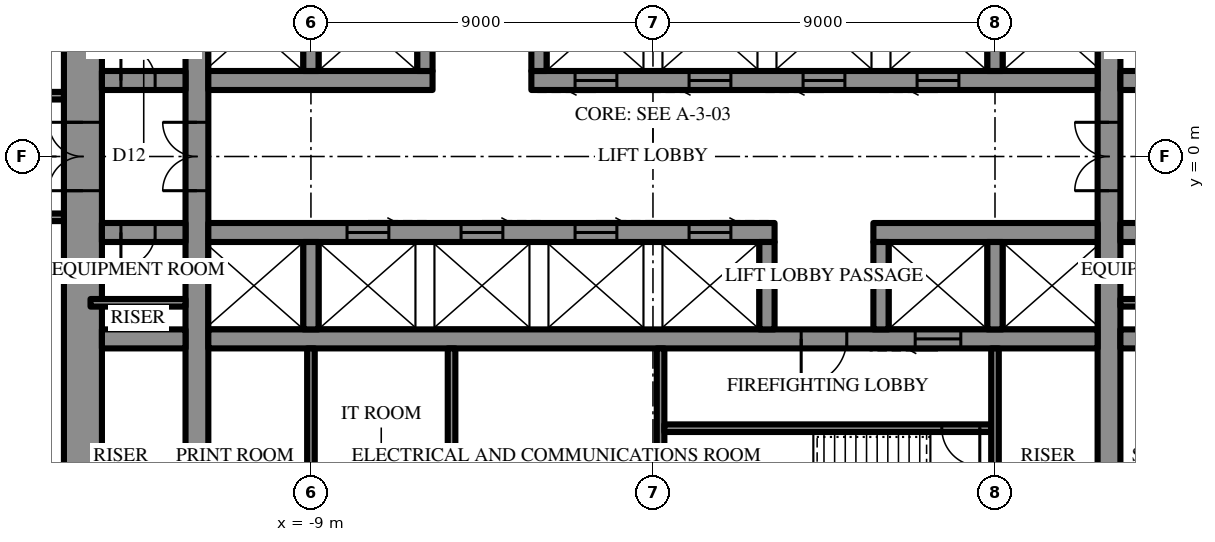
"""IFC4 building model, lengths in metres.
Left out: names, types, materials, properties, quantities, classifications, styles, units other than length and angle.
Written with IfcOpenShell. Run it as: python <this file> out.ifc"""

import sys

from ifc_helpers import new_model, si_unit, direction, frame, frame_2d, origin, place, context, subcontext, project, spatial, rectangle, extrude, element, fill, save


model = new_model("IFC4")
c1 = context("Model", 3, precision=1e-05, world=origin(), true_north=direction((0.0, 1.0)))
c2 = subcontext(c1, "Body", "Model", "MODEL_VIEW")
j1 = project(units=[si_unit("LENGTHUNIT", "METRE"), si_unit("PLANEANGLEUNIT", "RADIAN")], contexts=[c1])
p1 = place(None, origin())
s1 = spatial("IfcSite", under=j1, at=p1, CompositionType="ELEMENT")
p2 = place(p1, origin())
s2 = spatial("IfcBuilding", under=s1, at=p2, CompositionType="ELEMENT")
p3 = place(p2, frame((0.0, 0.0, 240.7)))
s3 = spatial("IfcBuildingStorey", under=s2, at=p3, CompositionType="ELEMENT", Elevation=240.7)
p4 = place(p3, frame((-15.0, 10.7, 0.0), z_axis=(0.0, 0.0, 1.0), x_axis=(0.0, -1.0, 0.0)))
e1 = element("IfcWall", 1, at=p4, inside=s3, PredefinedType="SHEAR", context=c2, shape_type="SweptSolid", body=[
    extrude(rectangle(XDim=21.4, YDim=1.0, at=frame_2d((10.7, 0.0))), origin(), (0.0, 0.0, 1.0), 4.2),
])
p5 = place(p4, frame((9.8, 0.0, 0.0)))
e2 = element("IfcOpeningElement", 2, at=p5, cuts=e1, PredefinedType="OPENING", context=c2, shape_type="SweptSolid", body=[
    extrude(rectangle(XDim=1.8, YDim=2.4, at=frame_2d((0.9, 1.2))), frame((0.0, 0.51, 0.0), z_axis=(0.0, -1.0, 0.0), x_axis=(1.0, 0.0, 0.0)), (0.0, 0.0, 1.0), 1.02),
])
p6 = place(p3, frame((12.0, -10.7, 0.0), z_axis=(0.0, 0.0, 1.0), x_axis=(0.0, 1.0, 0.0)))
e3 = element("IfcWall", 3, at=p6, inside=s3, PredefinedType="SHEAR", context=c2, shape_type="SweptSolid", body=[
    extrude(rectangle(XDim=21.4, YDim=0.6, at=frame_2d((10.7, 0.0))), origin(), (0.0, 0.0, 1.0), 4.2),
])
p7 = place(p6, frame((9.8, 0.0, 0.0)))
e4 = element("IfcOpeningElement", 4, at=p7, cuts=e3, PredefinedType="OPENING", context=c2, shape_type="SweptSolid", body=[
    extrude(rectangle(XDim=1.8, YDim=2.4, at=frame_2d((0.9, 1.2))), frame((0.0, 0.31, 0.0), z_axis=(0.0, -1.0, 0.0), x_axis=(1.0, 0.0, 0.0)), (0.0, 0.0, 1.0), 0.62),
])
p8 = place(p3, frame((-12.0, -10.7, 0.0), z_axis=(0.0, 0.0, 1.0), x_axis=(0.0, 1.0, 0.0)))
e5 = element("IfcWall", 5, at=p8, inside=s3, PredefinedType="SHEAR", context=c2, shape_type="SweptSolid", body=[
    extrude(rectangle(XDim=21.4, YDim=0.6, at=frame_2d((10.7, 0.0))), origin(), (0.0, 0.0, 1.0), 4.2),
])
p9 = place(p8, frame((9.8, 0.0, 0.0)))
e6 = element("IfcOpeningElement", 6, at=p9, cuts=e5, PredefinedType="OPENING", context=c2, shape_type="SweptSolid", body=[
    extrude(rectangle(XDim=1.8, YDim=2.4, at=frame_2d((0.9, 1.2))), frame((0.0, 0.31, 0.0), z_axis=(0.0, -1.0, 0.0), x_axis=(1.0, 0.0, 0.0)), (0.0, 0.0, 1.0), 0.62),
])
p10 = place(p3, frame((-14.5, 2.0, 0.0), z_axis=(0.0, 0.0, 1.0), x_axis=(1.0, 0.0, 0.0)))
e7 = element("IfcWall", 7, at=p10, inside=s3, PredefinedType="SHEAR", context=c2, shape_type="SweptSolid", body=[
    extrude(rectangle(XDim=2.2, YDim=0.5, at=frame_2d((1.1, 0.0))), origin(), (0.0, 0.0, 1.0), 4.2),
])
p11 = place(p10, frame((0.5, 0.0, 0.0)))
e8 = element("IfcOpeningElement", 8, at=p11, cuts=e7, PredefinedType="OPENING", context=c2, shape_type="SweptSolid", body=[
    extrude(rectangle(XDim=0.9, YDim=2.2, at=frame_2d((0.45, 1.1))), frame((0.0, 0.26, 0.0), z_axis=(0.0, -1.0, 0.0), x_axis=(1.0, 0.0, 0.0)), (0.0, 0.0, 1.0), 0.52),
])
p12 = place(p3, frame((-11.7, 2.0, 0.0), z_axis=(0.0, 0.0, 1.0), x_axis=(1.0, 0.0, 0.0)))
e9 = element("IfcWall", 9, at=p12, inside=s3, PredefinedType="SHEAR", context=c2, shape_type="SweptSolid", body=[
    extrude(rectangle(XDim=5.9, YDim=0.5, at=frame_2d((2.95, 0.0))), origin(), (0.0, 0.0, 1.0), 4.2),
])
p13 = place(p3, frame((-3.2, 2.0, 0.0), z_axis=(0.0, 0.0, 1.0), x_axis=(1.0, 0.0, 0.0)))
e10 = element("IfcWall", 10, at=p13, inside=s3, PredefinedType="SHEAR", context=c2, shape_type="SweptSolid", body=[
    extrude(rectangle(XDim=14.9, YDim=0.5, at=frame_2d((7.45, 0.0))), origin(), (0.0, 0.0, 1.0), 4.2),
])
p14 = place(p13, frame((1.15, 0.0, 0.0)))
e11 = element("IfcOpeningElement", 11, at=p14, cuts=e10, PredefinedType="OPENING", context=c2, shape_type="SweptSolid", body=[
    extrude(rectangle(XDim=1.1, YDim=2.2, at=frame_2d((0.55, 1.1))), frame((0.0, 0.26, 0.0), z_axis=(0.0, -1.0, 0.0), x_axis=(1.0, 0.0, 0.0)), (0.0, 0.0, 1.0), 0.52),
])
p15 = place(p13, frame((4.15, 0.0, 0.0)))
e12 = element("IfcOpeningElement", 12, at=p15, cuts=e10, PredefinedType="OPENING", context=c2, shape_type="SweptSolid", body=[
    extrude(rectangle(XDim=1.1, YDim=2.2, at=frame_2d((0.55, 1.1))), frame((0.0, 0.26, 0.0), z_axis=(0.0, -1.0, 0.0), x_axis=(1.0, 0.0, 0.0)), (0.0, 0.0, 1.0), 0.52),
])
p16 = place(p13, frame((7.15, 0.0, 0.0)))
e13 = element("IfcOpeningElement", 13, at=p16, cuts=e10, PredefinedType="OPENING", context=c2, shape_type="SweptSolid", body=[
    extrude(rectangle(XDim=1.1, YDim=2.2, at=frame_2d((0.55, 1.1))), frame((0.0, 0.26, 0.0), z_axis=(0.0, -1.0, 0.0), x_axis=(1.0, 0.0, 0.0)), (0.0, 0.0, 1.0), 0.52),
])
p17 = place(p13, frame((10.15, 0.0, 0.0)))
e14 = element("IfcOpeningElement", 14, at=p17, cuts=e10, PredefinedType="OPENING", context=c2, shape_type="SweptSolid", body=[
    extrude(rectangle(XDim=1.1, YDim=2.2, at=frame_2d((0.55, 1.1))), frame((0.0, 0.26, 0.0), z_axis=(0.0, -1.0, 0.0), x_axis=(1.0, 0.0, 0.0)), (0.0, 0.0, 1.0), 0.52),
])
p18 = place(p3, frame((12.3, 2.0, 0.0), z_axis=(0.0, 0.0, 1.0), x_axis=(1.0, 0.0, 0.0)))
e15 = element("IfcWall", 15, at=p18, inside=s3, PredefinedType="SHEAR", context=c2, shape_type="SweptSolid", body=[
    extrude(rectangle(XDim=2.2, YDim=0.5, at=frame_2d((1.1, 0.0))), origin(), (0.0, 0.0, 1.0), 4.2),
])
p19 = place(p18, frame((0.8, 0.0, 0.0)))
e16 = element("IfcOpeningElement", 16, at=p19, cuts=e15, PredefinedType="OPENING", context=c2, shape_type="SweptSolid", body=[
    extrude(rectangle(XDim=0.9, YDim=2.2, at=frame_2d((0.45, 1.1))), frame((0.0, 0.26, 0.0), z_axis=(0.0, -1.0, 0.0), x_axis=(1.0, 0.0, 0.0)), (0.0, 0.0, 1.0), 0.52),
])
for number, where, z_axis, x_axis in (
    (17, (-9.0, 2.25, 0.0), (0.0, 0.0, 1.0), (0.0, 1.0, 0.0)),
    (18, (-6.0, 2.25, 0.0), (0.0, 0.0, 1.0), (0.0, 1.0, 0.0)),
    (19, (-3.0, 2.25, 0.0), (0.0, 0.0, 1.0), (0.0, 1.0, 0.0)),
    (20, (9.0, 2.25, 0.0), (0.0, 0.0, 1.0), (0.0, 1.0, 0.0)),
):
    element("IfcWall", number, at=place(p3, frame(where, z_axis=z_axis, x_axis=x_axis)), inside=s3, PredefinedType="SHEAR", context=c2, shape_type="SweptSolid", body=[
        extrude(rectangle(XDim=2.3, YDim=0.4, at=frame_2d((1.15, 0.0))), origin(), (0.0, 0.0, 1.0), 4.2),
    ])
p20 = place(p3, frame((14.5, -2.0, 0.0), z_axis=(0.0, 0.0, 1.0), x_axis=(-1.0, 0.0, 0.0)))
e21 = element("IfcWall", 21, at=p20, inside=s3, PredefinedType="SHEAR", context=c2, shape_type="SweptSolid", body=[
    extrude(rectangle(XDim=2.2, YDim=0.5, at=frame_2d((1.1, 0.0))), origin(), (0.0, 0.0, 1.0), 4.2),
])
p21 = place(p20, frame((0.5, 0.0, 0.0)))
e22 = element("IfcOpeningElement", 22, at=p21, cuts=e21, PredefinedType="OPENING", context=c2, shape_type="SweptSolid", body=[
    extrude(rectangle(XDim=0.9, YDim=2.2, at=frame_2d((0.45, 1.1))), frame((0.0, 0.26, 0.0), z_axis=(0.0, -1.0, 0.0), x_axis=(1.0, 0.0, 0.0)), (0.0, 0.0, 1.0), 0.52),
])
p22 = place(p3, frame((11.7, -2.0, 0.0), z_axis=(0.0, 0.0, 1.0), x_axis=(-1.0, 0.0, 0.0)))
e23 = element("IfcWall", 23, at=p22, inside=s3, PredefinedType="SHEAR", context=c2, shape_type="SweptSolid", body=[
    extrude(rectangle(XDim=5.9, YDim=0.5, at=frame_2d((2.95, 0.0))), origin(), (0.0, 0.0, 1.0), 4.2),
])
p23 = place(p3, frame((3.2, -2.0, 0.0), z_axis=(0.0, 0.0, 1.0), x_axis=(-1.0, 0.0, 0.0)))
e24 = element("IfcWall", 24, at=p23, inside=s3, PredefinedType="SHEAR", context=c2, shape_type="SweptSolid", body=[
    extrude(rectangle(XDim=14.9, YDim=0.5, at=frame_2d((7.45, 0.0))), origin(), (0.0, 0.0, 1.0), 4.2),
])
p24 = place(p23, frame((1.15, 0.0, 0.0)))
e25 = element("IfcOpeningElement", 25, at=p24, cuts=e24, PredefinedType="OPENING", context=c2, shape_type="SweptSolid", body=[
    extrude(rectangle(XDim=1.1, YDim=2.2, at=frame_2d((0.55, 1.1))), frame((0.0, 0.26, 0.0), z_axis=(0.0, -1.0, 0.0), x_axis=(1.0, 0.0, 0.0)), (0.0, 0.0, 1.0), 0.52),
])
p25 = place(p23, frame((4.15, 0.0, 0.0)))
e26 = element("IfcOpeningElement", 26, at=p25, cuts=e24, PredefinedType="OPENING", context=c2, shape_type="SweptSolid", body=[
    extrude(rectangle(XDim=1.1, YDim=2.2, at=frame_2d((0.55, 1.1))), frame((0.0, 0.26, 0.0), z_axis=(0.0, -1.0, 0.0), x_axis=(1.0, 0.0, 0.0)), (0.0, 0.0, 1.0), 0.52),
])
p26 = place(p23, frame((7.15, 0.0, 0.0)))
e27 = element("IfcOpeningElement", 27, at=p26, cuts=e24, PredefinedType="OPENING", context=c2, shape_type="SweptSolid", body=[
    extrude(rectangle(XDim=1.1, YDim=2.2, at=frame_2d((0.55, 1.1))), frame((0.0, 0.26, 0.0), z_axis=(0.0, -1.0, 0.0), x_axis=(1.0, 0.0, 0.0)), (0.0, 0.0, 1.0), 0.52),
])
p27 = place(p23, frame((10.15, 0.0, 0.0)))
e28 = element("IfcOpeningElement", 28, at=p27, cuts=e24, PredefinedType="OPENING", context=c2, shape_type="SweptSolid", body=[
    extrude(rectangle(XDim=1.1, YDim=2.2, at=frame_2d((0.55, 1.1))), frame((0.0, 0.26, 0.0), z_axis=(0.0, -1.0, 0.0), x_axis=(1.0, 0.0, 0.0)), (0.0, 0.0, 1.0), 0.52),
])
p28 = place(p3, frame((-12.3, -2.0, 0.0), z_axis=(0.0, 0.0, 1.0), x_axis=(-1.0, 0.0, 0.0)))
e29 = element("IfcWall", 29, at=p28, inside=s3, PredefinedType="SHEAR", context=c2, shape_type="SweptSolid", body=[
    extrude(rectangle(XDim=2.2, YDim=0.5, at=frame_2d((1.1, 0.0))), origin(), (0.0, 0.0, 1.0), 4.2),
])
p29 = place(p28, frame((0.8, 0.0, 0.0)))
e30 = element("IfcOpeningElement", 30, at=p29, cuts=e29, PredefinedType="OPENING", context=c2, shape_type="SweptSolid", body=[
    extrude(rectangle(XDim=0.9, YDim=2.2, at=frame_2d((0.45, 1.1))), frame((0.0, 0.26, 0.0), z_axis=(0.0, -1.0, 0.0), x_axis=(1.0, 0.0, 0.0)), (0.0, 0.0, 1.0), 0.52),
])
p30 = place(p3, frame((14.5, -4.8, 0.0), z_axis=(0.0, 0.0, 1.0), x_axis=(-1.0, 0.0, 0.0)))
e31 = element("IfcWall", 31, at=p30, inside=s3, PredefinedType="SHEAR", context=c2, shape_type="SweptSolid", body=[
    extrude(rectangle(XDim=2.2, YDim=0.5, at=frame_2d((1.1, 0.0))), origin(), (0.0, 0.0, 1.0), 4.2),
])
p31 = place(p3, frame((11.7, -4.8, 0.0), z_axis=(0.0, 0.0, 1.0), x_axis=(-1.0, 0.0, 0.0)))
e32 = element("IfcWall", 32, at=p31, inside=s3, PredefinedType="SHEAR", context=c2, shape_type="SweptSolid", body=[
    extrude(rectangle(XDim=23.4, YDim=0.5, at=frame_2d((11.7, 0.0))), origin(), (0.0, 0.0, 1.0), 4.2),
])
p32 = place(p31, frame((6.6, 0.0, 0.0)))
e33 = element("IfcOpeningElement", 33, at=p32, cuts=e32, PredefinedType="OPENING", context=c2, shape_type="SweptSolid", body=[
    extrude(rectangle(XDim=1.2, YDim=2.2, at=frame_2d((0.6, 1.1))), frame((0.0, 0.26, 0.0), z_axis=(0.0, -1.0, 0.0), x_axis=(1.0, 0.0, 0.0)), (0.0, 0.0, 1.0), 0.52),
])
p33 = place(p31, frame((3.6, 0.0, 0.0)))
e34 = element("IfcOpeningElement", 34, at=p33, cuts=e32, PredefinedType="OPENING", context=c2, shape_type="SweptSolid", body=[
    extrude(rectangle(XDim=1.2, YDim=2.2, at=frame_2d((0.6, 1.1))), frame((0.0, 0.26, 0.0), z_axis=(0.0, -1.0, 0.0), x_axis=(1.0, 0.0, 0.0)), (0.0, 0.0, 1.0), 0.52),
])
p34 = place(p3, frame((-12.3, -4.8, 0.0), z_axis=(0.0, 0.0, 1.0), x_axis=(-1.0, 0.0, 0.0)))
e35 = element("IfcWall", 35, at=p34, inside=s3, PredefinedType="SHEAR", context=c2, shape_type="SweptSolid", body=[
    extrude(rectangle(XDim=2.2, YDim=0.5, at=frame_2d((1.1, 0.0))), origin(), (0.0, 0.0, 1.0), 4.2),
])
for number, where, z_axis, x_axis in (
    (36, (9.0, -2.25, 0.0), (0.0, 0.0, 1.0), (0.0, -1.0, 0.0)),
    (37, (6.0, -2.25, 0.0), (0.0, 0.0, 1.0), (0.0, -1.0, 0.0)),
    (38, (3.0, -2.25, 0.0), (0.0, 0.0, 1.0), (0.0, -1.0, 0.0)),
    (39, (-9.0, -2.25, 0.0), (0.0, 0.0, 1.0), (0.0, -1.0, 0.0)),
):
    element("IfcWall", number, at=place(p3, frame(where, z_axis=z_axis, x_axis=x_axis)), inside=s3, PredefinedType="SHEAR", context=c2, shape_type="SweptSolid", body=[
        extrude(rectangle(XDim=2.3, YDim=0.4, at=frame_2d((1.15, 0.0))), origin(), (0.0, 0.0, 1.0), 4.2),
    ])
p35 = place(p3, frame((0.2, -5.05, 0.0), z_axis=(0.0, 0.0, 1.0), x_axis=(0.0, -1.0, 0.0)))
e40 = element("IfcWall", 40, at=p35, inside=s3, PredefinedType="SHEAR", context=c2, shape_type="SweptSolid", body=[
    extrude(rectangle(XDim=5.65, YDim=0.2, at=frame_2d((2.825, 0.0))), origin(), (0.0, 0.0, 1.0), 4.2),
])
p36 = place(p3, frame((8.9, -7.15, 0.0), z_axis=(0.0, 0.0, 1.0), x_axis=(-1.0, 0.0, 0.0)))
e41 = element("IfcWall", 41, at=p36, inside=s3, PredefinedType="SHEAR", context=c2, shape_type="SweptSolid", body=[
    extrude(rectangle(XDim=8.6, YDim=0.2, at=frame_2d((4.3, 0.0))), origin(), (0.0, 0.0, 1.0), 4.2),
])
p37 = place(p36, frame((0.3, 0.0, 0.0)))
e42 = element("IfcOpeningElement", 42, at=p37, cuts=e41, PredefinedType="OPENING", context=c2, shape_type="SweptSolid", body=[
    extrude(rectangle(XDim=1.0, YDim=2.2, at=frame_2d((0.5, 1.1))), frame((0.0, 0.11, 0.0), z_axis=(0.0, -1.0, 0.0), x_axis=(1.0, 0.0, 0.0)), (0.0, 0.0, 1.0), 0.22),
])
for number, where, z_axis, x_axis in (
    (43, (9.0, -5.05, 0.0), (0.0, 0.0, 1.0), (0.0, -1.0, 0.0)),
    (44, (-9.0, -5.05, 0.0), (0.0, 0.0, 1.0), (0.0, -1.0, 0.0)),
    (45, (-5.3, -5.05, 0.0), (0.0, 0.0, 1.0), (0.0, -1.0, 0.0)),
):
    element("IfcWall", number, at=place(p3, frame(where, z_axis=z_axis, x_axis=x_axis)), inside=s3, PredefinedType="PARTITIONING", context=c2, shape_type="SweptSolid", body=[
        extrude(rectangle(XDim=5.65, YDim=0.2, at=frame_2d((2.825, 0.0))), origin(), (0.0, 0.0, 1.0), 4.0),
    ])
for number, where, z_axis, x_axis in (
    (46, (14.8, -3.85, 0.0), (0.0, 0.0, 1.0), (-1.0, 0.0, 0.0)),
    (47, (-12.3, -3.85, 0.0), (0.0, 0.0, 1.0), (-1.0, 0.0, 0.0)),
):
    element("IfcWall", number, at=place(p3, frame(where, z_axis=z_axis, x_axis=x_axis)), inside=s3, PredefinedType="PARTITIONING", context=c2, shape_type="SweptSolid", body=[
        extrude(rectangle(XDim=2.5, YDim=0.2, at=frame_2d((1.25, 0.0))), origin(), (0.0, 0.0, 1.0), 4.0),
    ])
p38 = place(p3, frame((-15.5, 1.6, 0.0), z_axis=(0.0, 0.0, 1.0), x_axis=(-1.0, 0.0, 0.0)))
e48 = element("IfcWall", 48, at=p38, inside=s3, PredefinedType="PARTITIONING", context=c2, shape_type="SweptSolid", body=[
    extrude(rectangle(XDim=9.7, YDim=0.2, at=frame_2d((4.85, 0.0))), origin(), (0.0, 0.0, 1.0), 4.0),
])
p39 = place(p38, frame((6.29, 0.0, 0.0)))
e49 = element("IfcOpeningElement", 49, at=p39, cuts=e48, PredefinedType="OPENING", context=c2, shape_type="SweptSolid", body=[
    extrude(rectangle(XDim=1.0, YDim=2.2, at=frame_2d((0.5, 1.1))), frame((0.0, 0.11, 0.0), z_axis=(0.0, -1.0, 0.0), x_axis=(1.0, 0.0, 0.0)), (0.0, 0.0, 1.0), 0.22),
])
p40 = place(p3, frame((-15.5, -1.6, 0.0), z_axis=(0.0, 0.0, 1.0), x_axis=(-1.0, 0.0, 0.0)))
e50 = element("IfcWall", 50, at=p40, inside=s3, PredefinedType="PARTITIONING", context=c2, shape_type="SweptSolid", body=[
    extrude(rectangle(XDim=2.3, YDim=0.2, at=frame_2d((1.15, 0.0))), origin(), (0.0, 0.0, 1.0), 4.0),
])
p41 = place(p5, frame((1.8, 0.0, 0.0), z_axis=(0.0, 0.0, 1.0), x_axis=(-1.0, 0.0, 0.0)))
e51 = element("IfcDoor", 51, at=p41, inside=s3, OperationType="DOUBLE_DOOR_SINGLE_SWING", PredefinedType="DOOR", context=c2, shape_type="SweptSolid", body=[
    extrude(rectangle(XDim=1.8, YDim=2.4, at=frame_2d((0.9, 1.2))), frame((0.0, 0.025, 0.0), z_axis=(0.0, -1.0, 0.0), x_axis=(1.0, 0.0, 0.0)), (0.0, 0.0, 1.0), 0.05),
])
fill(e2, e51)
p42 = place(p32, origin())
e52 = element("IfcDoor", 52, at=p42, inside=s3, OperationType="SINGLE_SWING_LEFT", PredefinedType="DOOR", context=c2, shape_type="SweptSolid", body=[
    extrude(rectangle(XDim=1.2, YDim=2.2, at=frame_2d((0.6, 1.1))), frame((0.0, 0.025, 0.0), z_axis=(0.0, -1.0, 0.0), x_axis=(1.0, 0.0, 0.0)), (0.0, 0.0, 1.0), 0.05),
])
fill(e33, e52)
p43 = place(p37, origin())
e53 = element("IfcDoor", 53, at=p43, inside=s3, OperationType="SINGLE_SWING_RIGHT", PredefinedType="DOOR", context=c2, shape_type="SweptSolid", body=[
    extrude(rectangle(XDim=1.0, YDim=2.2, at=frame_2d((0.5, 1.1))), frame((0.0, 0.025, 0.0), z_axis=(0.0, -1.0, 0.0), x_axis=(1.0, 0.0, 0.0)), (0.0, 0.0, 1.0), 0.05),
])
fill(e42, e53)
p44 = place(p11, origin())
e54 = element("IfcDoor", 54, at=p44, inside=s3, OperationType="SINGLE_SWING_RIGHT", PredefinedType="DOOR", context=c2, shape_type="SweptSolid", body=[
    extrude(rectangle(XDim=0.9, YDim=2.2, at=frame_2d((0.45, 1.1))), frame((0.0, 0.025, 0.0), z_axis=(0.0, -1.0, 0.0), x_axis=(1.0, 0.0, 0.0)), (0.0, 0.0, 1.0), 0.05),
])
fill(e8, e54)
p45 = place(p29, origin())
e55 = element("IfcDoor", 55, at=p45, inside=s3, OperationType="SINGLE_SWING_LEFT", PredefinedType="DOOR", context=c2, shape_type="SweptSolid", body=[
    extrude(rectangle(XDim=0.9, YDim=2.2, at=frame_2d((0.45, 1.1))), frame((0.0, 0.025, 0.0), z_axis=(0.0, -1.0, 0.0), x_axis=(1.0, 0.0, 0.0)), (0.0, 0.0, 1.0), 0.05),
])
fill(e30, e55)
p46 = place(p7, origin())
e56 = element("IfcDoor", 56, at=p46, inside=s3, OperationType="DOUBLE_DOOR_SINGLE_SWING", PredefinedType="DOOR", context=c2, shape_type="SweptSolid", body=[
    extrude(rectangle(XDim=1.8, YDim=2.4, at=frame_2d((0.9, 1.2))), frame((0.0, 0.025, 0.0), z_axis=(0.0, -1.0, 0.0), x_axis=(1.0, 0.0, 0.0)), (0.0, 0.0, 1.0), 0.05),
])
fill(e4, e56)
p47 = place(p9, origin())
e57 = element("IfcDoor", 57, at=p47, inside=s3, OperationType="DOUBLE_DOOR_SINGLE_SWING", PredefinedType="DOOR", context=c2, shape_type="SweptSolid", body=[
    extrude(rectangle(XDim=1.8, YDim=2.4, at=frame_2d((0.9, 1.2))), frame((0.0, 0.025, 0.0), z_axis=(0.0, -1.0, 0.0), x_axis=(1.0, 0.0, 0.0)), (0.0, 0.0, 1.0), 0.05),
])
fill(e6, e57)
p48 = place(p14, frame((1.1, 0.0, 0.0), z_axis=(0.0, 0.0, 1.0), x_axis=(-1.0, 0.0, 0.0)))
e58 = element("IfcDoor", 58, at=p48, inside=s3, OperationType="SLIDING_TO_LEFT", PredefinedType="DOOR", context=c2, shape_type="SweptSolid", body=[
    extrude(rectangle(XDim=1.1, YDim=2.2, at=frame_2d((0.55, 1.1))), frame((0.0, 0.025, 0.0), z_axis=(0.0, -1.0, 0.0), x_axis=(1.0, 0.0, 0.0)), (0.0, 0.0, 1.0), 0.05),
])
fill(e11, e58)
p49 = place(p15, frame((1.1, 0.0, 0.0), z_axis=(0.0, 0.0, 1.0), x_axis=(-1.0, 0.0, 0.0)))
e59 = element("IfcDoor", 59, at=p49, inside=s3, OperationType="SLIDING_TO_LEFT", PredefinedType="DOOR", context=c2, shape_type="SweptSolid", body=[
    extrude(rectangle(XDim=1.1, YDim=2.2, at=frame_2d((0.55, 1.1))), frame((0.0, 0.025, 0.0), z_axis=(0.0, -1.0, 0.0), x_axis=(1.0, 0.0, 0.0)), (0.0, 0.0, 1.0), 0.05),
])
fill(e12, e59)
p50 = place(p16, frame((1.1, 0.0, 0.0), z_axis=(0.0, 0.0, 1.0), x_axis=(-1.0, 0.0, 0.0)))
e60 = element("IfcDoor", 60, at=p50, inside=s3, OperationType="SLIDING_TO_LEFT", PredefinedType="DOOR", context=c2, shape_type="SweptSolid", body=[
    extrude(rectangle(XDim=1.1, YDim=2.2, at=frame_2d((0.55, 1.1))), frame((0.0, 0.025, 0.0), z_axis=(0.0, -1.0, 0.0), x_axis=(1.0, 0.0, 0.0)), (0.0, 0.0, 1.0), 0.05),
])
fill(e13, e60)
p51 = place(p17, frame((1.1, 0.0, 0.0), z_axis=(0.0, 0.0, 1.0), x_axis=(-1.0, 0.0, 0.0)))
e61 = element("IfcDoor", 61, at=p51, inside=s3, OperationType="SLIDING_TO_LEFT", PredefinedType="DOOR", context=c2, shape_type="SweptSolid", body=[
    extrude(rectangle(XDim=1.1, YDim=2.2, at=frame_2d((0.55, 1.1))), frame((0.0, 0.025, 0.0), z_axis=(0.0, -1.0, 0.0), x_axis=(1.0, 0.0, 0.0)), (0.0, 0.0, 1.0), 0.05),
])
fill(e14, e61)
p52 = place(p33, origin())
e62 = element("IfcDoor", 62, at=p52, inside=s3, OperationType="SLIDING_TO_LEFT", PredefinedType="DOOR", context=c2, shape_type="SweptSolid", body=[
    extrude(rectangle(XDim=1.2, YDim=2.2, at=frame_2d((0.6, 1.1))), frame((0.0, 0.025, 0.0), z_axis=(0.0, -1.0, 0.0), x_axis=(1.0, 0.0, 0.0)), (0.0, 0.0, 1.0), 0.05),
])
fill(e34, e62)
p53 = place(p24, frame((1.1, 0.0, 0.0), z_axis=(0.0, 0.0, 1.0), x_axis=(-1.0, 0.0, 0.0)))
e63 = element("IfcDoor", 63, at=p53, inside=s3, OperationType="SLIDING_TO_LEFT", PredefinedType="DOOR", context=c2, shape_type="SweptSolid", body=[
    extrude(rectangle(XDim=1.1, YDim=2.2, at=frame_2d((0.55, 1.1))), frame((0.0, 0.025, 0.0), z_axis=(0.0, -1.0, 0.0), x_axis=(1.0, 0.0, 0.0)), (0.0, 0.0, 1.0), 0.05),
])
fill(e25, e63)
p54 = place(p25, frame((1.1, 0.0, 0.0), z_axis=(0.0, 0.0, 1.0), x_axis=(-1.0, 0.0, 0.0)))
e64 = element("IfcDoor", 64, at=p54, inside=s3, OperationType="SLIDING_TO_LEFT", PredefinedType="DOOR", context=c2, shape_type="SweptSolid", body=[
    extrude(rectangle(XDim=1.1, YDim=2.2, at=frame_2d((0.55, 1.1))), frame((0.0, 0.025, 0.0), z_axis=(0.0, -1.0, 0.0), x_axis=(1.0, 0.0, 0.0)), (0.0, 0.0, 1.0), 0.05),
])
fill(e26, e64)
p55 = place(p26, frame((1.1, 0.0, 0.0), z_axis=(0.0, 0.0, 1.0), x_axis=(-1.0, 0.0, 0.0)))
e65 = element("IfcDoor", 65, at=p55, inside=s3, OperationType="SLIDING_TO_LEFT", PredefinedType="DOOR", context=c2, shape_type="SweptSolid", body=[
    extrude(rectangle(XDim=1.1, YDim=2.2, at=frame_2d((0.55, 1.1))), frame((0.0, 0.025, 0.0), z_axis=(0.0, -1.0, 0.0), x_axis=(1.0, 0.0, 0.0)), (0.0, 0.0, 1.0), 0.05),
])
fill(e27, e65)
p56 = place(p27, frame((1.1, 0.0, 0.0), z_axis=(0.0, 0.0, 1.0), x_axis=(-1.0, 0.0, 0.0)))
e66 = element("IfcDoor", 66, at=p56, inside=s3, OperationType="SLIDING_TO_LEFT", PredefinedType="DOOR", context=c2, shape_type="SweptSolid", body=[
    extrude(rectangle(XDim=1.1, YDim=2.2, at=frame_2d((0.55, 1.1))), frame((0.0, 0.025, 0.0), z_axis=(0.0, -1.0, 0.0), x_axis=(1.0, 0.0, 0.0)), (0.0, 0.0, 1.0), 0.05),
])
fill(e28, e66)
save(model, sys.argv[1])
